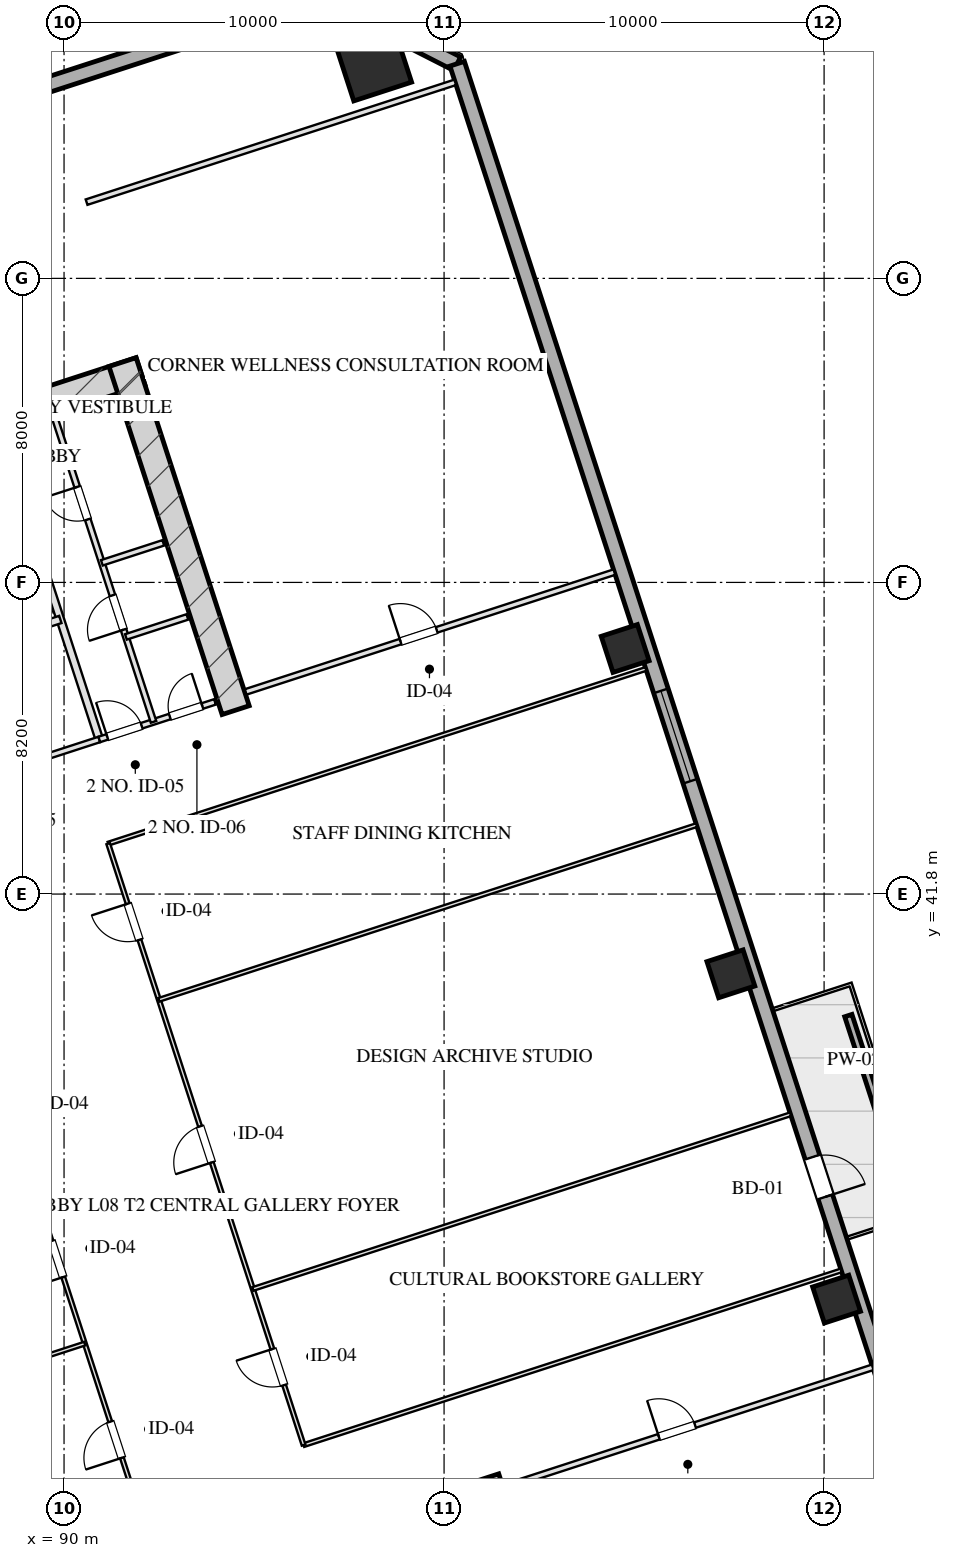
"""IFC4 building model, lengths in metres.
Left out: names, types, materials, properties, quantities, classifications, styles, units other than length and angle.
Written with IfcOpenShell. Run it as: python <this file> out.ifc"""

import sys

from ifc_helpers import new_model, si_unit, direction, frame, frame_2d, origin, origin_2d, place, context, subcontext, project, spatial, rectangle, hollow_rectangle, extrude, element, fill, save


model = new_model("IFC4")
c1 = context("Model", 3, precision=1e-05, world=origin(), true_north=direction((0.0, 1.0)))
c2 = subcontext(c1, "Body", "Model", "MODEL_VIEW")
j1 = project(units=[si_unit("LENGTHUNIT", "METRE"), si_unit("PLANEANGLEUNIT", "RADIAN")], contexts=[c1])
p1 = place(None, origin())
s1 = spatial("IfcSite", under=j1, at=p1, CompositionType="ELEMENT")
p2 = place(p1, origin())
s2 = spatial("IfcBuilding", under=s1, at=p2, CompositionType="ELEMENT")
p3 = place(p2, frame((0.0, 0.0, 38.0)))
s3 = spatial("IfcBuildingStorey", under=s2, at=p3, CompositionType="ELEMENT", Elevation=38.0)
p4 = place(p3, frame((101.082, 26.429, 0.0), z_axis=(0.0, 0.0, 1.0), x_axis=(0.309016134813, -0.951056795583, 0.0)))
e1 = element("IfcWall", 1, at=p4, inside=s3, PredefinedType="SHEAR", context=c2, shape_type="SweptSolid", body=[
    extrude(rectangle(XDim=9.63, YDim=0.75, at=frame_2d((4.815, 0.0))), origin(), (0.0, 0.0, 1.0), 4.0),
])
p5 = place(p3, frame((76.272, 50.443, 0.0), z_axis=(0.0, 0.0, 1.0), x_axis=(0.951056072937, 0.309018358888, 0.0)))
e2 = element("IfcWall", 2, at=p5, inside=s3, PredefinedType="SHEAR", context=c2, shape_type="SweptSolid", body=[
    extrude(rectangle(XDim=16.55, YDim=0.75, at=frame_2d((8.275, 0.0))), origin(), (0.0, 0.0, 1.0), 4.0),
])
p6 = place(p3, frame((94.515, 46.639, 0.0), z_axis=(0.0, 0.0, 1.0), x_axis=(-0.309016134813, 0.951056795583, 0.0)))
e3 = element("IfcWall", 3, at=p6, inside=s3, PredefinedType="SHEAR", context=c2, shape_type="SweptSolid", body=[
    extrude(rectangle(XDim=9.63, YDim=0.75, at=frame_2d((4.815, 0.0))), origin(), (0.0, 0.0, 1.0), 4.0),
])
p7 = place(p3, frame((98.137, 63.677, 0.0), z_axis=(0.0, 0.0, 1.0), x_axis=(0.951056516295, 0.309016994375, 0.0)))
e4 = element("IfcColumn", 4, at=p7, inside=s3, PredefinedType="COLUMN", context=c2, shape_type="SweptSolid", body=[
    extrude(hollow_rectangle(XDim=1.6, YDim=1.6, WallThickness=0.055, at=origin_2d()), origin(), (0.0, 0.0, 1.0), 4.001),
])
for number, where, z_axis, x_axis in (
    (5, (110.328, 31.142, 0.0), (0.0, 0.0, 1.0), (0.951, 0.309, 0.0)),
    (6, (107.547, 39.701, 0.0), (0.0, 0.0, 1.0), (0.951, 0.309, 0.0)),
    (7, (104.766, 48.261, 0.0), (0.0, 0.0, 1.0), (0.951, 0.309, 0.0)),
):
    element("IfcColumn", number, at=place(p3, frame(where, z_axis=z_axis, x_axis=x_axis)), inside=s3, PredefinedType="COLUMN", context=c2, shape_type="SweptSolid", body=[
        extrude(hollow_rectangle(XDim=1.0, YDim=1.0, WallThickness=0.036, at=origin_2d()), origin(), (0.0, 0.0, 1.0), 4.001),
    ])
p8 = place(p3, frame((66.002, 55.433, 0.0), z_axis=(0.0, 0.0, 1.0), x_axis=(0.951055939317, 0.309018770125, 0.0)))
e8 = element("IfcWall", 8, at=p8, inside=s3, PredefinedType="SOLIDWALL", context=c2, shape_type="SweptSolid", body=[
    extrude(rectangle(XDim=32.4, YDim=0.4, at=frame_2d((16.2, 0.0))), origin(), (0.0, 0.0, 1.0), 3.16),
])
p9 = place(p3, frame((96.816, 65.446, 0.0), z_axis=(0.0, 0.0, 1.0), x_axis=(0.890998089617, -0.454007053137, 0.0)))
e9 = element("IfcWall", 9, at=p9, inside=s3, PredefinedType="SOLIDWALL", context=c2, shape_type="SweptSolid", body=[
    extrude(rectangle(XDim=3.96, YDim=0.4, at=frame_2d((1.98, 0.0))), origin(), (0.0, 0.0, 1.0), 3.16),
])
p10 = place(p3, frame((100.345, 63.648, 0.0), z_axis=(0.0, 0.0, 1.0), x_axis=(0.309014526607, -0.951057318118, 0.0)))
e10 = element("IfcWall", 10, at=p10, inside=s3, PredefinedType="SOLIDWALL", context=c2, shape_type="SweptSolid", body=[
    extrude(rectangle(XDim=50.0, YDim=0.4, at=frame_2d((25.0, 0.0))), origin(), (0.0, 0.0, 1.0), 3.16),
])
p11 = place(p10, frame((17.35, 0.0, 0.75)))
e11 = element("IfcOpeningElement", 11, at=p11, cuts=e10, PredefinedType="OPENING", context=c2, shape_type="SweptSolid", body=[
    extrude(rectangle(XDim=2.5, YDim=1.75, at=frame_2d((1.25, 0.875))), frame((0.0, 0.21, 0.0), z_axis=(0.0, -1.0, 0.0), x_axis=(1.0, 0.0, 0.0)), (0.0, 0.0, 1.0), 0.42),
])
p12 = place(p10, frame((30.25, 0.0, 0.0)))
e12 = element("IfcOpeningElement", 12, at=p12, cuts=e10, PredefinedType="OPENING", context=c2, shape_type="SweptSolid", body=[
    extrude(rectangle(XDim=1.1, YDim=2.15, at=frame_2d((0.55, 1.075))), frame((0.0, 0.21, 0.0), z_axis=(0.0, -1.0, 0.0), x_axis=(1.0, 0.0, 0.0)), (0.0, 0.0, 1.0), 0.42),
])
p13 = place(p3, frame((112.121, 34.038, 0.0), z_axis=(0.0, 0.0, 1.0), x_axis=(-0.309032019345, 0.951051634255, 0.0)))
e13 = element("IfcWall", 13, at=p13, inside=s3, PredefinedType="PARAPET", context=c2, shape_type="SweptSolid", body=[
    extrude(rectangle(XDim=4.8, YDim=0.2, at=frame_2d((2.4, 0.0))), origin(), (0.0, 0.0, 1.0), 0.75),
])
p14 = place(p3, frame((90.928, 45.868, 0.0), z_axis=(0.0, 0.0, 1.0), x_axis=(-0.309042196757, 0.951048327176, 0.0)))
e14 = element("IfcWall", 14, at=p14, inside=s3, PredefinedType="PARTITIONING", context=c2, shape_type="SweptSolid", body=[
    extrude(rectangle(XDim=8.43, YDim=0.2, at=frame_2d((4.215, 0.0))), origin(), (0.0, 0.0, 1.0), 3.725),
])
p15 = place(p3, frame((86.743, 44.508, 0.0), z_axis=(0.0, 0.0, 1.0), x_axis=(0.951063829732, 0.308994485023, 0.0)))
e15 = element("IfcWall", 15, at=p15, inside=s3, PredefinedType="PARTITIONING", context=c2, shape_type="SweptSolid", body=[
    extrude(rectangle(XDim=4.4, YDim=0.15, at=frame_2d((2.2, 0.0))), origin(), (0.0, 0.0, 1.0), 3.725),
])
p16 = place(p15, frame((1.45, 0.0, 0.0)))
e16 = element("IfcOpeningElement", 16, at=p16, cuts=e15, PredefinedType="OPENING", context=c2, shape_type="SweptSolid", body=[
    extrude(rectangle(XDim=1.5, YDim=2.05, at=frame_2d((0.75, 1.025))), frame((0.0, 0.085, 0.0), z_axis=(0.0, -1.0, 0.0), x_axis=(1.0, 0.0, 0.0)), (0.0, 0.0, 1.0), 0.17),
])
p17 = place(p3, frame((85.718, 47.666, 0.0), z_axis=(0.0, 0.0, 1.0), x_axis=(0.951058531764, 0.30901079133, 0.0)))
e17 = element("IfcWall", 17, at=p17, inside=s3, PredefinedType="PARTITIONING", context=c2, shape_type="SweptSolid", body=[
    extrude(rectangle(XDim=4.4, YDim=0.2, at=frame_2d((2.2, 0.0))), origin(), (0.0, 0.0, 1.0), 3.725),
])
p18 = place(p17, frame((0.45, 0.0, 0.0)))
e18 = element("IfcOpeningElement", 18, at=p18, cuts=e17, PredefinedType="OPENING", context=c2, shape_type="SweptSolid", body=[
    extrude(rectangle(XDim=1.1, YDim=2.05, at=frame_2d((0.55, 1.025))), frame((0.0, 0.11, 0.0), z_axis=(0.0, -1.0, 0.0), x_axis=(1.0, 0.0, 0.0)), (0.0, 0.0, 1.0), 0.22),
])
p19 = place(p17, frame((2.55, 0.0, 0.0)))
e19 = element("IfcOpeningElement", 19, at=p19, cuts=e17, PredefinedType="OPENING", context=c2, shape_type="SweptSolid", body=[
    extrude(rectangle(XDim=1.1, YDim=2.05, at=frame_2d((0.55, 1.025))), frame((0.0, 0.11, 0.0), z_axis=(0.0, -1.0, 0.0), x_axis=(1.0, 0.0, 0.0)), (0.0, 0.0, 1.0), 0.22),
])
p20 = place(p3, frame((90.928, 45.868, 0.0), z_axis=(0.0, 0.0, 1.0), x_axis=(0.951059297078, 0.309008435874, 0.0)))
e20 = element("IfcWall", 20, at=p20, inside=s3, PredefinedType="PARTITIONING", context=c2, shape_type="SweptSolid", body=[
    extrude(rectangle(XDim=3.2, YDim=0.15, at=frame_2d((1.6, 0.0))), origin(), (0.0, 0.0, 1.0), 3.725),
])
p21 = place(p20, frame((0.22, 0.0, 0.0)))
e21 = element("IfcOpeningElement", 21, at=p21, cuts=e20, PredefinedType="OPENING", context=c2, shape_type="SweptSolid", body=[
    extrude(rectangle(XDim=0.95, YDim=2.05, at=frame_2d((0.475, 1.025))), frame((0.0, 0.085, 0.0), z_axis=(0.0, -1.0, 0.0), x_axis=(1.0, 0.0, 0.0)), (0.0, 0.0, 1.0), 0.17),
])
p22 = place(p20, frame((1.95, 0.0, 0.0)))
e22 = element("IfcOpeningElement", 22, at=p22, cuts=e20, PredefinedType="OPENING", context=c2, shape_type="SweptSolid", body=[
    extrude(rectangle(XDim=0.9, YDim=2.05, at=frame_2d((0.45, 1.025))), frame((0.0, 0.085, 0.0), z_axis=(0.0, -1.0, 0.0), x_axis=(1.0, 0.0, 0.0)), (0.0, 0.0, 1.0), 0.17),
])
p23 = place(p3, frame((92.355, 46.331, 0.0), z_axis=(0.0, 0.0, 1.0), x_axis=(-0.309007490203, 0.951059604335, 0.0)))
e23 = element("IfcWall", 23, at=p23, inside=s3, PredefinedType="PARTITIONING", context=c2, shape_type="SweptSolid", body=[
    extrude(rectangle(XDim=8.43, YDim=0.15, at=frame_2d((4.215, 0.0))), origin(), (0.0, 0.0, 1.0), 3.725),
])
p24 = place(p23, frame((2.55, 0.0, 0.0)))
e24 = element("IfcOpeningElement", 24, at=p24, cuts=e23, PredefinedType="OPENING", context=c2, shape_type="SweptSolid", body=[
    extrude(rectangle(XDim=0.95, YDim=2.05, at=frame_2d((0.475, 1.025))), frame((0.0, 0.085, 0.0), z_axis=(0.0, -1.0, 0.0), x_axis=(1.0, 0.0, 0.0)), (0.0, 0.0, 1.0), 0.17),
])
p25 = place(p23, frame((5.6, 0.0, 0.0)))
e25 = element("IfcOpeningElement", 25, at=p25, cuts=e23, PredefinedType="OPENING", context=c2, shape_type="SweptSolid", body=[
    extrude(rectangle(XDim=0.9, YDim=2.05, at=frame_2d((0.45, 1.025))), frame((0.0, 0.085, 0.0), z_axis=(0.0, -1.0, 0.0), x_axis=(1.0, 0.0, 0.0)), (0.0, 0.0, 1.0), 0.17),
])
p26 = place(p3, frame((90.995, 50.516, 0.0), z_axis=(0.0, 0.0, 1.0), x_axis=(0.951040401051, 0.309066587596, 0.0)))
e26 = element("IfcWall", 26, at=p26, inside=s3, PredefinedType="PARTITIONING", context=c2, shape_type="SweptSolid", body=[
    extrude(rectangle(XDim=1.7, YDim=0.15, at=frame_2d((0.85, 0.0))), origin(), (0.0, 0.0, 1.0), 3.725),
])
p27 = place(p3, frame((91.628, 48.566, 0.0), z_axis=(0.0, 0.0, 1.0), x_axis=(0.951054116971, 0.309024378638, 0.0)))
e27 = element("IfcWall", 27, at=p27, inside=s3, PredefinedType="PARTITIONING", context=c2, shape_type="SweptSolid", body=[
    extrude(rectangle(XDim=1.7, YDim=0.15, at=frame_2d((0.85, 0.0))), origin(), (0.0, 0.0, 1.0), 3.725),
])
p28 = place(p3, frame((101.578, 26.196, 0.0), z_axis=(0.0, 0.0, 1.0), x_axis=(0.951059043131, 0.309009217467, 0.0)))
e28 = element("IfcWall", 28, at=p28, inside=s3, PredefinedType="PARTITIONING", context=c2, shape_type="SweptSolid", body=[
    extrude(rectangle(XDim=10.2, YDim=0.15, at=frame_2d((5.1, 0.0))), origin(), (0.0, 0.0, 1.0), 3.725),
])
p29 = place(p28, frame((4.284, 0.0, 0.0)))
e29 = element("IfcOpeningElement", 29, at=p29, cuts=e28, PredefinedType="OPENING", context=c2, shape_type="SweptSolid", body=[
    extrude(rectangle(XDim=1.0, YDim=2.05, at=frame_2d((0.5, 1.025))), frame((0.0, 0.085, 0.0), z_axis=(0.0, -1.0, 0.0), x_axis=(1.0, 0.0, 0.0)), (0.0, 0.0, 1.0), 0.17),
])
p30 = place(p3, frame((90.593, 60.006, 0.0), z_axis=(0.0, 0.0, 1.0), x_axis=(0.951059043131, 0.309009217467, 0.0)))
e30 = element("IfcWall", 30, at=p30, inside=s3, PredefinedType="PARTITIONING", context=c2, shape_type="SweptSolid", body=[
    extrude(rectangle(XDim=10.2, YDim=0.15, at=frame_2d((5.1, 0.0))), origin(), (0.0, 0.0, 1.0), 3.725),
])
p31 = place(p3, frame((94.78, 47.119, 0.0), z_axis=(0.0, 0.0, 1.0), x_axis=(0.951054294345, 0.309023832749, 0.0)))
e31 = element("IfcWall", 31, at=p31, inside=s3, PredefinedType="PARTITIONING", context=c2, shape_type="SweptSolid", body=[
    extrude(rectangle(XDim=10.2, YDim=0.15, at=frame_2d((5.1, 0.0))), origin(), (0.0, 0.0, 1.0), 3.725),
])
p32 = place(p31, frame((4.284, 0.0, 0.0)))
e32 = element("IfcOpeningElement", 32, at=p32, cuts=e31, PredefinedType="OPENING", context=c2, shape_type="SweptSolid", body=[
    extrude(rectangle(XDim=1.0, YDim=2.05, at=frame_2d((0.5, 1.025))), frame((0.0, 0.085, 0.0), z_axis=(0.0, -1.0, 0.0), x_axis=(1.0, 0.0, 0.0)), (0.0, 0.0, 1.0), 0.17),
])
for number, where, z_axis, x_axis in (
    (33, (96.304, 27.3, 0.0), (0.0, 0.0, 1.0), (0.951, 0.309, 0.0)),
    (34, (91.162, 43.126, 0.0), (0.0, 0.0, 1.0), (0.951, 0.309, 0.0)),
):
    element("IfcWall", number, at=place(p3, frame(where, z_axis=z_axis, x_axis=x_axis)), inside=s3, PredefinedType="MOVABLE", context=c2, shape_type="SweptSolid", body=[
        extrude(rectangle(XDim=14.875, YDim=0.1, at=frame_2d((7.438, 0.0))), origin(), (0.0, 0.0, 1.0), 3.725),
    ])
p33 = place(p3, frame((91.882, 25.863, 0.0), z_axis=(0.0, 0.0, 1.0), x_axis=(-0.309022042254, 0.951054876125, 0.0)))
e35 = element("IfcWall", 35, at=p33, inside=s3, PredefinedType="MOVABLE", context=c2, shape_type="SweptSolid", body=[
    extrude(rectangle(XDim=16.64, YDim=0.1, at=frame_2d((8.32, 0.0))), origin(), (0.0, 0.0, 1.0), 3.725),
])
p34 = place(p33, frame((1.16, 0.0, 0.0)))
e36 = element("IfcOpeningElement", 36, at=p34, cuts=e35, PredefinedType="OPENING", context=c2, shape_type="SweptSolid", body=[
    extrude(rectangle(XDim=1.0, YDim=2.05, at=frame_2d((0.5, 1.025))), frame((0.0, 0.06, 0.0), z_axis=(0.0, -1.0, 0.0), x_axis=(1.0, 0.0, 0.0)), (0.0, 0.0, 1.0), 0.12),
])
p35 = place(p33, frame((6.16, 0.0, 0.0)))
e37 = element("IfcOpeningElement", 37, at=p35, cuts=e35, PredefinedType="OPENING", context=c2, shape_type="SweptSolid", body=[
    extrude(rectangle(XDim=1.0, YDim=2.05, at=frame_2d((0.5, 1.025))), frame((0.0, 0.06, 0.0), z_axis=(0.0, -1.0, 0.0), x_axis=(1.0, 0.0, 0.0)), (0.0, 0.0, 1.0), 0.12),
])
p36 = place(p33, frame((10.16, 0.0, 0.0)))
e38 = element("IfcOpeningElement", 38, at=p36, cuts=e35, PredefinedType="OPENING", context=c2, shape_type="SweptSolid", body=[
    extrude(rectangle(XDim=1.0, YDim=2.05, at=frame_2d((0.5, 1.025))), frame((0.0, 0.06, 0.0), z_axis=(0.0, -1.0, 0.0), x_axis=(1.0, 0.0, 0.0)), (0.0, 0.0, 1.0), 0.12),
])
p37 = place(p33, frame((14.48, 0.0, 0.0)))
e39 = element("IfcOpeningElement", 39, at=p37, cuts=e35, PredefinedType="OPENING", context=c2, shape_type="SweptSolid", body=[
    extrude(rectangle(XDim=1.05, YDim=2.05, at=frame_2d((0.525, 1.025))), frame((0.0, 0.06, 0.0), z_axis=(0.0, -1.0, 0.0), x_axis=(1.0, 0.0, 0.0)), (0.0, 0.0, 1.0), 0.12),
])
p38 = place(p3, frame((96.304, 27.3, 0.0), z_axis=(0.0, 0.0, 1.0), x_axis=(-0.30901773025, 0.951056277195, 0.0)))
e40 = element("IfcWall", 40, at=p38, inside=s3, PredefinedType="MOVABLE", context=c2, shape_type="SweptSolid", body=[
    extrude(rectangle(XDim=16.64, YDim=0.1, at=frame_2d((8.32, 0.0))), origin(), (0.0, 0.0, 1.0), 3.725),
])
p39 = place(p38, frame((1.66, 0.0, 0.0)))
e41 = element("IfcOpeningElement", 41, at=p39, cuts=e40, PredefinedType="OPENING", context=c2, shape_type="SweptSolid", body=[
    extrude(rectangle(XDim=1.0, YDim=2.05, at=frame_2d((0.5, 1.025))), frame((0.0, 0.06, 0.0), z_axis=(0.0, -1.0, 0.0), x_axis=(1.0, 0.0, 0.0)), (0.0, 0.0, 1.0), 0.12),
])
p40 = place(p38, frame((7.82, 0.0, 0.0)))
e42 = element("IfcOpeningElement", 42, at=p40, cuts=e40, PredefinedType="OPENING", context=c2, shape_type="SweptSolid", body=[
    extrude(rectangle(XDim=1.0, YDim=2.05, at=frame_2d((0.5, 1.025))), frame((0.0, 0.06, 0.0), z_axis=(0.0, -1.0, 0.0), x_axis=(1.0, 0.0, 0.0)), (0.0, 0.0, 1.0), 0.12),
])
p41 = place(p38, frame((13.98, 0.0, 0.0)))
e43 = element("IfcOpeningElement", 43, at=p41, cuts=e40, PredefinedType="OPENING", context=c2, shape_type="SweptSolid", body=[
    extrude(rectangle(XDim=1.0, YDim=2.05, at=frame_2d((0.5, 1.025))), frame((0.0, 0.06, 0.0), z_axis=(0.0, -1.0, 0.0), x_axis=(1.0, 0.0, 0.0)), (0.0, 0.0, 1.0), 0.12),
])
p42 = place(p3, frame((73.356, 24.386, 0.0), z_axis=(0.0, 0.0, 1.0), x_axis=(0.951057491432, 0.309013993197, 0.0)))
e44 = element("IfcWall", 44, at=p42, inside=s3, PredefinedType="MOVABLE", context=c2, shape_type="SweptSolid", body=[
    extrude(rectangle(XDim=18.075, YDim=0.1, at=frame_2d((9.038, 0.0))), origin(), (0.0, 0.0, 1.0), 3.725),
])
for number, where, z_axis, x_axis in (
    (45, (94.969, 31.409, 0.0), (0.0, 0.0, 1.0), (0.951, 0.309, 0.0)),
    (46, (92.497, 39.017, 0.0), (0.0, 0.0, 1.0), (0.951, 0.309, 0.0)),
):
    element("IfcWall", number, at=place(p3, frame(where, z_axis=z_axis, x_axis=x_axis)), inside=s3, PredefinedType="MOVABLE", context=c2, shape_type="SweptSolid", body=[
        extrude(rectangle(XDim=14.875, YDim=0.1, at=frame_2d((7.438, 0.0))), origin(), (0.0, 0.0, 1.0), 3.725),
    ])
p43 = place(p11, origin())
e47 = element("IfcWindow", 47, at=p43, inside=s3, PartitioningType="TRIPLE_PANEL_VERTICAL", PredefinedType="WINDOW", context=c2, shape_type="SweptSolid", body=[
    extrude(rectangle(XDim=2.5, YDim=1.75, at=frame_2d((1.25, 0.875))), frame((0.0, 0.03, 0.0), z_axis=(0.0, -1.0, 0.0), x_axis=(1.0, 0.0, 0.0)), (0.0, 0.0, 1.0), 0.06),
])
fill(e11, e47)
p44 = place(p12, origin())
e48 = element("IfcDoor", 48, at=p44, inside=s3, OperationType="SINGLE_SWING_RIGHT", PredefinedType="DOOR", context=c2, shape_type="SweptSolid", body=[
    extrude(rectangle(XDim=1.1, YDim=2.15, at=frame_2d((0.55, 1.075))), frame((0.0, 0.025, 0.0), z_axis=(0.0, -1.0, 0.0), x_axis=(1.0, 0.0, 0.0)), (0.0, 0.0, 1.0), 0.05),
])
fill(e12, e48)
p45 = place(p21, origin())
e49 = element("IfcDoor", 49, at=p45, inside=s3, OperationType="SINGLE_SWING_LEFT", PredefinedType="DOOR", context=c2, shape_type="SweptSolid", body=[
    extrude(rectangle(XDim=0.95, YDim=2.05, at=frame_2d((0.475, 1.025))), frame((0.0, 0.025, 0.0), z_axis=(0.0, -1.0, 0.0), x_axis=(1.0, 0.0, 0.0)), (0.0, 0.0, 1.0), 0.05),
])
fill(e21, e49)
p46 = place(p22, origin())
e50 = element("IfcDoor", 50, at=p46, inside=s3, OperationType="SINGLE_SWING_RIGHT", PredefinedType="DOOR", context=c2, shape_type="SweptSolid", body=[
    extrude(rectangle(XDim=0.9, YDim=2.05, at=frame_2d((0.45, 1.025))), frame((0.0, 0.025, 0.0), z_axis=(0.0, -1.0, 0.0), x_axis=(1.0, 0.0, 0.0)), (0.0, 0.0, 1.0), 0.05),
])
fill(e22, e50)
p47 = place(p24, origin())
e51 = element("IfcDoor", 51, at=p47, inside=s3, OperationType="SINGLE_SWING_LEFT", PredefinedType="DOOR", context=c2, shape_type="SweptSolid", body=[
    extrude(rectangle(XDim=0.95, YDim=2.05, at=frame_2d((0.475, 1.025))), frame((0.0, 0.025, 0.0), z_axis=(0.0, -1.0, 0.0), x_axis=(1.0, 0.0, 0.0)), (0.0, 0.0, 1.0), 0.05),
])
fill(e24, e51)
p48 = place(p25, origin())
e52 = element("IfcDoor", 52, at=p48, inside=s3, OperationType="SINGLE_SWING_RIGHT", PredefinedType="DOOR", context=c2, shape_type="SweptSolid", body=[
    extrude(rectangle(XDim=0.9, YDim=2.05, at=frame_2d((0.45, 1.025))), frame((0.0, 0.025, 0.0), z_axis=(0.0, -1.0, 0.0), x_axis=(1.0, 0.0, 0.0)), (0.0, 0.0, 1.0), 0.05),
])
fill(e25, e52)
p49 = place(p29, origin())
e53 = element("IfcDoor", 53, at=p49, inside=s3, OperationType="SINGLE_SWING_LEFT", PredefinedType="DOOR", context=c2, shape_type="SweptSolid", body=[
    extrude(rectangle(XDim=1.0, YDim=2.05, at=frame_2d((0.5, 1.025))), frame((0.0, 0.025, 0.0), z_axis=(0.0, -1.0, 0.0), x_axis=(1.0, 0.0, 0.0)), (0.0, 0.0, 1.0), 0.05),
])
fill(e29, e53)
p50 = place(p32, origin())
e54 = element("IfcDoor", 54, at=p50, inside=s3, OperationType="SINGLE_SWING_LEFT", PredefinedType="DOOR", context=c2, shape_type="SweptSolid", body=[
    extrude(rectangle(XDim=1.0, YDim=2.05, at=frame_2d((0.5, 1.025))), frame((0.0, 0.025, 0.0), z_axis=(0.0, -1.0, 0.0), x_axis=(1.0, 0.0, 0.0)), (0.0, 0.0, 1.0), 0.05),
])
fill(e32, e54)
p51 = place(p34, origin())
e55 = element("IfcDoor", 55, at=p51, inside=s3, OperationType="SINGLE_SWING_LEFT", PredefinedType="DOOR", context=c2, shape_type="SweptSolid", body=[
    extrude(rectangle(XDim=1.0, YDim=2.05, at=frame_2d((0.5, 1.025))), frame((0.0, 0.025, 0.0), z_axis=(0.0, -1.0, 0.0), x_axis=(1.0, 0.0, 0.0)), (0.0, 0.0, 1.0), 0.05),
])
fill(e36, e55)
p52 = place(p35, origin())
e56 = element("IfcDoor", 56, at=p52, inside=s3, OperationType="SINGLE_SWING_LEFT", PredefinedType="DOOR", context=c2, shape_type="SweptSolid", body=[
    extrude(rectangle(XDim=1.0, YDim=2.05, at=frame_2d((0.5, 1.025))), frame((0.0, 0.025, 0.0), z_axis=(0.0, -1.0, 0.0), x_axis=(1.0, 0.0, 0.0)), (0.0, 0.0, 1.0), 0.05),
])
fill(e37, e56)
p53 = place(p39, origin())
e57 = element("IfcDoor", 57, at=p53, inside=s3, OperationType="SINGLE_SWING_RIGHT", PredefinedType="DOOR", context=c2, shape_type="SweptSolid", body=[
    extrude(rectangle(XDim=1.0, YDim=2.05, at=frame_2d((0.5, 1.025))), frame((0.0, 0.025, 0.0), z_axis=(0.0, -1.0, 0.0), x_axis=(1.0, 0.0, 0.0)), (0.0, 0.0, 1.0), 0.05),
])
fill(e41, e57)
p54 = place(p40, origin())
e58 = element("IfcDoor", 58, at=p54, inside=s3, OperationType="SINGLE_SWING_LEFT", PredefinedType="DOOR", context=c2, shape_type="SweptSolid", body=[
    extrude(rectangle(XDim=1.0, YDim=2.05, at=frame_2d((0.5, 1.025))), frame((0.0, 0.025, 0.0), z_axis=(0.0, -1.0, 0.0), x_axis=(1.0, 0.0, 0.0)), (0.0, 0.0, 1.0), 0.05),
])
fill(e42, e58)
p55 = place(p41, origin())
e59 = element("IfcDoor", 59, at=p55, inside=s3, OperationType="SINGLE_SWING_RIGHT", PredefinedType="DOOR", context=c2, shape_type="SweptSolid", body=[
    extrude(rectangle(XDim=1.0, YDim=2.05, at=frame_2d((0.5, 1.025))), frame((0.0, 0.025, 0.0), z_axis=(0.0, -1.0, 0.0), x_axis=(1.0, 0.0, 0.0)), (0.0, 0.0, 1.0), 0.05),
])
fill(e43, e59)
save(model, sys.argv[1])
